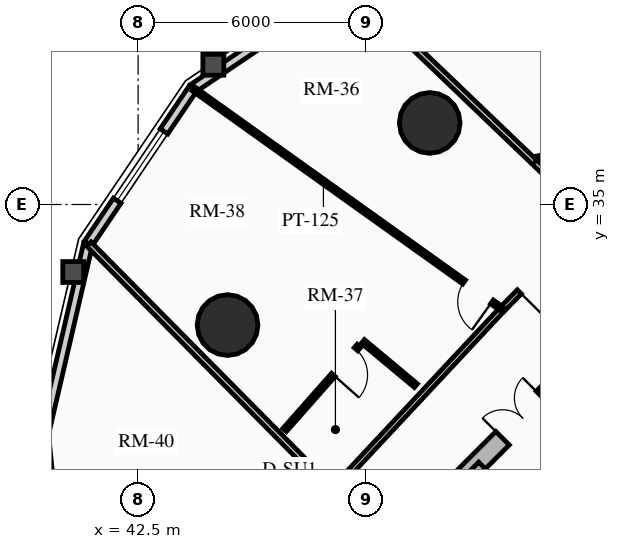
"""IFC4 building model, lengths in metres.
Left out: names, types, materials, properties, quantities, classifications, styles, units other than length and angle.
Written with IfcOpenShell. Run it as: python <this file> out.ifc"""

import sys

from ifc_helpers import new_model, si_unit, direction, frame, frame_2d, origin, origin_2d, place, context, subcontext, project, spatial, rectangle, circle, extrude, source, transform, mapped, element, fill, save


model = new_model("IFC4")
c1 = context("Model", 3, precision=1e-05, world=origin(), true_north=direction((0.0, 1.0)))
c2 = subcontext(c1, "Body", "Model", "MODEL_VIEW")
j1 = project(units=[si_unit("LENGTHUNIT", "METRE"), si_unit("PLANEANGLEUNIT", "RADIAN")], contexts=[c1])
p1 = place(None, origin())
s1 = spatial("IfcSite", under=j1, at=p1, CompositionType="ELEMENT")
p2 = place(p1, origin())
s2 = spatial("IfcBuilding", under=s1, at=p2, CompositionType="ELEMENT")
p3 = place(p2, frame((0.0, 0.0, 54.01)))
s3 = spatial("IfcBuildingStorey", under=s2, at=p3, CompositionType="ELEMENT", Elevation=54.01)
p4 = place(p3, frame((48.838, 25.596, 0.0), z_axis=(0.0, 0.0, 1.0), x_axis=(0.707106781187, 0.707106781187, 0.0)))
e1 = element("IfcWall", 1, at=p4, inside=s3, PredefinedType="SHEAR", context=c2, shape_type="SweptSolid", body=[
    extrude(rectangle(XDim=10.7, YDim=0.5, at=frame_2d((5.35, 0.0))), origin(), (0.0, 0.0, 1.0), 2.91),
])
m1 = source(origin(), c2, "Body", "SweptSolid", [
    extrude(rectangle(XDim=1.5, YDim=2.02, at=frame_2d((0.75, 1.01))), frame((0.0, 0.26, 0.0), z_axis=(0.0, -1.0, 0.0), x_axis=(1.0, 0.0, 0.0)), (0.0, 0.0, 1.0), 0.52),
])
p5 = place(p4, frame((4.6, 0.0, 0.0)))
e2 = element("IfcOpeningElement", 2, at=p5, cuts=e1, PredefinedType="OPENING", context=c2, shape_type="MappedRepresentation", body=[
    mapped(m1, transform((0.0, 0.0, 0.0), x_axis=(1.0, 0.0, 0.0), y_axis=(0.0, 1.0, 0.0), z_axis=(0.0, 0.0, 1.0), scale=1.0)),
])
p6 = place(p3, frame((61.096, 18.338, 0.0), z_axis=(0.0, 0.0, 1.0), x_axis=(-0.707106781187, 0.707106781187, 0.0)))
e3 = element("IfcWall", 3, at=p6, inside=s3, PredefinedType="SHEAR", context=c2, shape_type="SweptSolid", body=[
    extrude(rectangle(XDim=13.8, YDim=0.35, at=frame_2d((6.9, 0.0))), origin(), (0.0, 0.0, 1.0), 2.91),
])
m2 = source(origin(), c2, "Body", "SweptSolid", [
    extrude(rectangle(XDim=1.1, YDim=2.015, at=frame_2d((0.55, 1.007))), frame((0.0, 0.185, 0.0), z_axis=(0.0, -1.0, 0.0), x_axis=(1.0, 0.0, 0.0)), (0.0, 0.0, 1.0), 0.37),
])
p7 = place(p6, frame((4.9, 0.0, 0.0)))
e4 = element("IfcOpeningElement", 4, at=p7, cuts=e3, PredefinedType="OPENING", context=c2, shape_type="MappedRepresentation", body=[
    mapped(m2, transform((0.0, 0.0, 0.0), x_axis=(1.0, 0.0, 0.0), y_axis=(0.0, 1.0, 0.0), z_axis=(0.0, 0.0, 1.0), scale=1.0)),
])
m3 = source(origin(), c2, "Body", "SweptSolid", [
    extrude(rectangle(XDim=1.15, YDim=2.02, at=frame_2d((0.575, 1.01))), frame((0.0, 0.185, 0.0), z_axis=(0.0, -1.0, 0.0), x_axis=(1.0, 0.0, 0.0)), (0.0, 0.0, 1.0), 0.37),
])
p8 = place(p6, frame((7.32, 0.0, 0.0)))
e5 = element("IfcOpeningElement", 5, at=p8, cuts=e3, PredefinedType="OPENING", context=c2, shape_type="MappedRepresentation", body=[
    mapped(m3, transform((0.0, 0.0, 0.0), x_axis=(1.0, 0.0, 0.0), y_axis=(0.0, 1.0, 0.0), z_axis=(0.0, 0.0, 1.0), scale=1.0)),
])
for number, where, z_axis, x_axis in (
    (6, (50.173, 37.146, 0.0), (0.0, 0.0, 1.0), (1.0, 0.0, 0.0)),
    (7, (44.854, 31.827, 0.0), (0.0, 0.0, 1.0), (1.0, 0.0, 0.0)),
):
    element("IfcColumn", number, at=place(p3, frame(where, z_axis=z_axis, x_axis=x_axis)), inside=s3, PredefinedType="USERDEFINED", context=c2, shape_type="SweptSolid", body=[
        extrude(circle(Radius=0.8, at=origin_2d()), origin(), (0.0, 0.0, 1.0), 2.91),
    ])
p9 = place(p3, frame((43.945, 38.055, 0.0), z_axis=(0.0, 0.0, 1.0), x_axis=(0.828736708604, 0.559638693991, 0.0)))
e8 = element("IfcWall", 8, at=p9, inside=s3, PredefinedType="SOLIDWALL", context=c2, shape_type="SweptSolid", body=[
    extrude(rectangle(XDim=4.93, YDim=0.24, at=frame_2d((2.465, 0.0))), origin(), (0.0, 0.0, 1.0), 2.073),
])
p10 = place(p3, frame((41.186, 33.969, 0.0), z_axis=(0.0, 0.0, 1.0), x_axis=(0.559638693991, 0.828736708604, 0.0)))
e9 = element("IfcWall", 9, at=p10, inside=s3, PredefinedType="SOLIDWALL", context=c2, shape_type="SweptSolid", body=[
    extrude(rectangle(XDim=4.93, YDim=0.24, at=frame_2d((2.465, 0.0))), origin(), (0.0, 0.0, 1.0), 2.073),
])
m4 = source(origin(), c2, "Body", "SweptSolid", [
    extrude(rectangle(XDim=2.2, YDim=1.35, at=frame_2d((1.1, 0.675))), frame((0.0, 0.13, 0.0), z_axis=(0.0, -1.0, 0.0), x_axis=(1.0, 0.0, 0.0)), (0.0, 0.0, 1.0), 0.26),
])
p11 = place(p10, frame((1.365, 0.0, 0.65)))
e10 = element("IfcOpeningElement", 10, at=p11, cuts=e9, PredefinedType="OPENING", context=c2, shape_type="MappedRepresentation", body=[
    mapped(m4, transform((0.0, 0.0, 0.0), x_axis=(1.0, 0.0, 0.0), y_axis=(0.0, 1.0, 0.0), z_axis=(0.0, 0.0, 1.0), scale=1.0)),
])
p12 = place(p3, frame((40.024, 28.957, 0.0), z_axis=(0.0, 0.0, 1.0), x_axis=(0.225833060959, 0.974166016949, 0.0)))
e11 = element("IfcWall", 11, at=p12, inside=s3, PredefinedType="SOLIDWALL", context=c2, shape_type="SweptSolid", body=[
    extrude(rectangle(XDim=5.146, YDim=0.24, at=frame_2d((2.573, 0.0))), origin(), (0.0, 0.0, 1.0), 2.073),
])
p13 = place(p3, frame((40.572, 23.507, 0.0), z_axis=(0.0, 0.0, 1.0), x_axis=(-0.100165739718, 0.994970765694, 0.0)))
e12 = element("IfcWall", 12, at=p13, inside=s3, PredefinedType="SOLIDWALL", context=c2, shape_type="SweptSolid", body=[
    extrude(rectangle(XDim=5.477, YDim=0.24, at=frame_2d((2.738, 0.0))), origin(), (0.0, 0.0, 1.0), 2.073),
])
m5 = source(origin(), c2, "Body", "SweptSolid", [
    extrude(rectangle(XDim=1.9, YDim=1.35, at=frame_2d((0.95, 0.675))), frame((0.0, 0.13, 0.0), z_axis=(0.0, -1.0, 0.0), x_axis=(1.0, 0.0, 0.0)), (0.0, 0.0, 1.0), 0.26),
])
p14 = place(p13, frame((1.788, 0.0, 0.65)))
e13 = element("IfcOpeningElement", 13, at=p14, cuts=e12, PredefinedType="OPENING", context=c2, shape_type="MappedRepresentation", body=[
    mapped(m5, transform((0.0, 0.0, 0.0), x_axis=(1.0, 0.0, 0.0), y_axis=(0.0, 1.0, 0.0), z_axis=(0.0, 0.0, 1.0), scale=1.0)),
])
p15 = place(p3, frame((54.461, 34.648, 0.0), z_axis=(0.0, 0.0, 1.0), x_axis=(-0.70403409755, -0.710166170334, 0.0)))
e14 = element("IfcWall", 14, at=p15, inside=s3, PredefinedType="PARTITIONING", context=c2, shape_type="SweptSolid", body=[
    extrude(rectangle(XDim=3.384, YDim=0.15, at=frame_2d((1.692, 0.0))), origin(), (0.0, 0.0, 1.0), 2.159),
])
m6 = source(origin(), c2, "Body", "SweptSolid", [
    extrude(rectangle(XDim=1.05, YDim=2.015, at=frame_2d((0.525, 1.007))), frame((0.0, 0.085, 0.0), z_axis=(0.0, -1.0, 0.0), x_axis=(1.0, 0.0, 0.0)), (0.0, 0.0, 1.0), 0.17),
])
p16 = place(p15, frame((1.691, 0.0, 0.0)))
e15 = element("IfcOpeningElement", 15, at=p16, cuts=e14, PredefinedType="OPENING", context=c2, shape_type="MappedRepresentation", body=[
    mapped(m6, transform((0.0, 0.0, 0.0), x_axis=(1.0, 0.0, 0.0), y_axis=(0.0, 1.0, 0.0), z_axis=(0.0, 0.0, 1.0), scale=1.0)),
])
p17 = place(p3, frame((52.079, 32.244, 0.0), z_axis=(0.0, 0.0, 1.0), x_axis=(-0.682703325574, -0.730695674854, 0.0)))
e16 = element("IfcWall", 16, at=p17, inside=s3, PredefinedType="PARTITIONING", context=c2, shape_type="SweptSolid", body=[
    extrude(rectangle(XDim=6.527, YDim=0.15, at=frame_2d((3.263, 0.0))), origin(), (0.0, 0.0, 1.0), 2.159),
])
p18 = place(p3, frame((54.461, 34.648, 0.0), z_axis=(0.0, 0.0, 1.0), x_axis=(-0.722290498621, 0.691589788532, 0.0)))
e17 = element("IfcWall", 17, at=p18, inside=s3, PredefinedType="PARTITIONING", context=c2, shape_type="SweptSolid", body=[
    extrude(rectangle(XDim=8.891, YDim=0.16, at=frame_2d((4.445, 0.0))), origin(), (0.0, 0.0, 1.0), 2.073),
])
p19 = place(p3, frame((47.623, 27.475, 0.0), z_axis=(0.0, 0.0, 1.0), x_axis=(-0.703512438021, 0.71068294587, 0.0)))
e18 = element("IfcWall", 18, at=p19, inside=s3, PredefinedType="PARTITIONING", context=c2, shape_type="SweptSolid", body=[
    extrude(rectangle(XDim=9.125, YDim=0.16, at=frame_2d((4.562, 0.0))), origin(), (0.0, 0.0, 1.0), 2.073),
])
p20 = place(p3, frame((54.878, 36.644, 0.0), z_axis=(0.0, 0.0, 1.0), x_axis=(-0.974554917581, -0.224148862631, 0.0)))
e19 = element("IfcWall", 19, at=p20, inside=s3, PredefinedType="PARTITIONING", context=c2, shape_type="SweptSolid", body=[
    extrude(rectangle(XDim=1.982, YDim=0.125, at=frame_2d((0.991, 0.0))), origin(), (0.0, 0.0, 1.0), 2.635),
])
m7 = source(origin(), c2, "Body", "SweptSolid", [
    extrude(rectangle(XDim=0.9, YDim=2.005, at=frame_2d((0.45, 1.002))), frame((0.0, 0.073, 0.0), z_axis=(0.0, -1.0, 0.0), x_axis=(1.0, 0.0, 0.0)), (0.0, 0.0, 1.0), 0.145),
])
p21 = place(p20, frame((0.436, 0.0, 0.0)))
e20 = element("IfcOpeningElement", 20, at=p21, cuts=e19, PredefinedType="OPENING", context=c2, shape_type="MappedRepresentation", body=[
    mapped(m7, transform((0.0, 0.0, 0.0), x_axis=(1.0, 0.0, 0.0), y_axis=(0.0, 1.0, 0.0), z_axis=(0.0, 0.0, 1.0), scale=1.0)),
])
p22 = place(p3, frame((52.079, 32.244, 0.0), z_axis=(0.0, 0.0, 1.0), x_axis=(-0.813888867537, 0.581020577346, 0.0)))
e21 = element("IfcWall", 21, at=p22, inside=s3, PredefinedType="PARTITIONING", context=c2, shape_type="SweptSolid", body=[
    extrude(rectangle(XDim=9.977, YDim=0.125, at=frame_2d((4.988, 0.0))), origin(), (0.0, 0.0, 1.0), 2.073),
])
p23 = place(p22, frame((0.33, 0.0, 0.0)))
e22 = element("IfcOpeningElement", 22, at=p23, cuts=e21, PredefinedType="OPENING", context=c2, shape_type="MappedRepresentation", body=[
    mapped(m7, transform((0.0, 0.0, 0.0), x_axis=(1.0, 0.0, 0.0), y_axis=(0.0, 1.0, 0.0), z_axis=(0.0, 0.0, 1.0), scale=1.0)),
])
p24 = place(p3, frame((49.809, 30.234, 0.0), z_axis=(0.0, 0.0, 1.0), x_axis=(-0.76830950514, 0.640078514177, 0.0)))
e23 = element("IfcWall", 23, at=p24, inside=s3, PredefinedType="PARTITIONING", context=c2, shape_type="SweptSolid", body=[
    extrude(rectangle(XDim=1.814, YDim=0.125, at=frame_2d((0.907, 0.0))), origin(), (0.0, 0.0, 1.0), 2.635),
])
p25 = place(p3, frame((48.313, 31.28, 0.0), z_axis=(0.0, 0.0, 1.0), x_axis=(-0.662230126621, -0.749300513409, 0.0)))
e24 = element("IfcWall", 24, at=p25, inside=s3, PredefinedType="PARTITIONING", context=c2, shape_type="SweptSolid", body=[
    extrude(rectangle(XDim=2.958, YDim=0.125, at=frame_2d((1.479, 0.0))), origin(), (0.0, 0.0, 1.0), 2.159),
])
p26 = place(p25, frame((0.12, 0.0, 0.0)))
e25 = element("IfcOpeningElement", 25, at=p26, cuts=e24, PredefinedType="OPENING", context=c2, shape_type="MappedRepresentation", body=[
    mapped(m7, transform((0.0, 0.0, 0.0), x_axis=(1.0, 0.0, 0.0), y_axis=(0.0, 1.0, 0.0), z_axis=(0.0, 0.0, 1.0), scale=1.0)),
])
m8 = source(origin(), c2, "Body", "SweptSolid", [
    extrude(rectangle(XDim=2.2, YDim=1.35, at=frame_2d((1.1, 0.675))), frame((0.0, 0.03, 0.0), z_axis=(0.0, -1.0, 0.0), x_axis=(1.0, 0.0, 0.0)), (0.0, 0.0, 1.0), 0.06),
])
p27 = place(p11, origin())
e26 = element("IfcWindow", 26, at=p27, inside=s3, PartitioningType="DOUBLE_PANEL_VERTICAL", PredefinedType="WINDOW", context=c2, shape_type="MappedRepresentation", body=[
    mapped(m8, transform((0.0, 0.0, 0.0), x_axis=(1.0, 0.0, 0.0), y_axis=(0.0, 1.0, 0.0), z_axis=(0.0, 0.0, 1.0), scale=1.0)),
])
fill(e10, e26)
m9 = source(origin(), c2, "Body", "SweptSolid", [
    extrude(rectangle(XDim=1.5, YDim=2.02, at=frame_2d((0.75, 1.01))), frame((0.0, 0.025, 0.0), z_axis=(0.0, -1.0, 0.0), x_axis=(1.0, 0.0, 0.0)), (0.0, 0.0, 1.0), 0.05),
])
p28 = place(p5, origin())
e27 = element("IfcDoor", 27, at=p28, inside=s3, OperationType="DOUBLE_DOOR_SINGLE_SWING", PredefinedType="DOOR", context=c2, shape_type="MappedRepresentation", body=[
    mapped(m9, transform((0.0, 0.0, 0.0), x_axis=(1.0, 0.0, 0.0), y_axis=(0.0, 1.0, 0.0), z_axis=(0.0, 0.0, 1.0), scale=1.0)),
])
fill(e2, e27)
m10 = source(origin(), c2, "Body", "SweptSolid", [
    extrude(rectangle(XDim=1.05, YDim=2.015, at=frame_2d((0.525, 1.007))), frame((0.0, 0.025, 0.0), z_axis=(0.0, -1.0, 0.0), x_axis=(1.0, 0.0, 0.0)), (0.0, 0.0, 1.0), 0.05),
])
p29 = place(p16, origin())
e28 = element("IfcDoor", 28, at=p29, inside=s3, OperationType="SINGLE_SWING_RIGHT", PredefinedType="DOOR", context=c2, shape_type="MappedRepresentation", body=[
    mapped(m10, transform((0.0, 0.0, 0.0), x_axis=(1.0, 0.0, 0.0), y_axis=(0.0, 1.0, 0.0), z_axis=(0.0, 0.0, 1.0), scale=1.0)),
])
fill(e15, e28)
m11 = source(origin(), c2, "Body", "SweptSolid", [
    extrude(rectangle(XDim=0.9, YDim=2.005, at=frame_2d((0.45, 1.002))), frame((0.0, 0.025, 0.0), z_axis=(0.0, -1.0, 0.0), x_axis=(1.0, 0.0, 0.0)), (0.0, 0.0, 1.0), 0.05),
])
p30 = place(p23, origin())
e29 = element("IfcDoor", 29, at=p30, inside=s3, OperationType="SINGLE_SWING_LEFT", PredefinedType="DOOR", context=c2, shape_type="MappedRepresentation", body=[
    mapped(m11, transform((0.0, 0.0, 0.0), x_axis=(1.0, 0.0, 0.0), y_axis=(0.0, 1.0, 0.0), z_axis=(0.0, 0.0, 1.0), scale=1.0)),
])
fill(e22, e29)
p31 = place(p26, origin())
e30 = element("IfcDoor", 30, at=p31, inside=s3, OperationType="SINGLE_SWING_RIGHT", PredefinedType="DOOR", context=c2, shape_type="MappedRepresentation", body=[
    mapped(m11, transform((0.0, 0.0, 0.0), x_axis=(1.0, 0.0, 0.0), y_axis=(0.0, 1.0, 0.0), z_axis=(0.0, 0.0, 1.0), scale=1.0)),
])
fill(e25, e30)
save(model, sys.argv[1])
